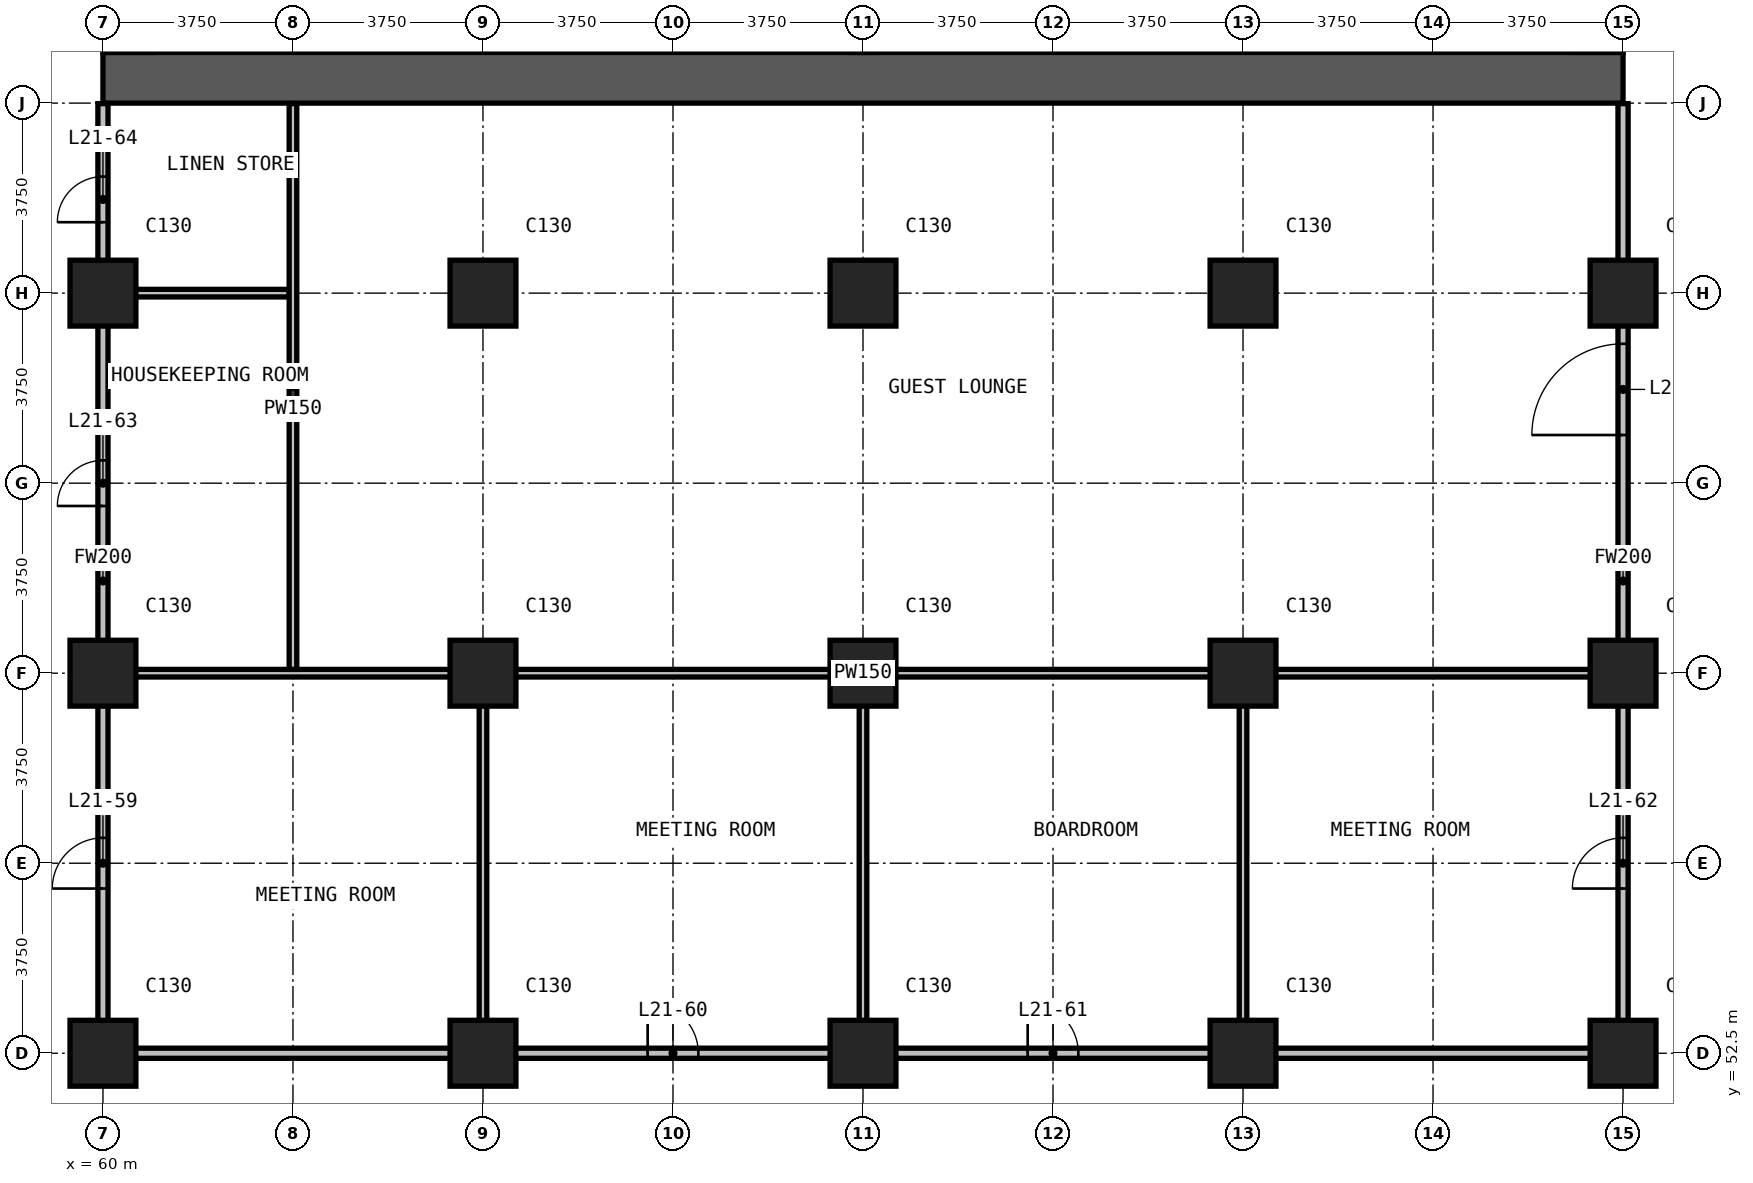
"""IFC4 building model, lengths in metres.
Left out: names, types, materials, properties, quantities, classifications, styles, units other than length and angle.
Written with IfcOpenShell. Run it as: python <this file> out.ifc"""

import sys

from ifc_helpers import new_model, si_unit, direction, frame, frame_2d, origin, origin_2d, place, context, subcontext, project, spatial, rectangle, extrude, element, fill, save


model = new_model("IFC4")
c1 = context("Model", 3, precision=1e-05, world=origin(), true_north=direction((0.0, 1.0)))
c2 = subcontext(c1, "Body", "Model", "MODEL_VIEW")
j1 = project(units=[si_unit("LENGTHUNIT", "METRE"), si_unit("PLANEANGLEUNIT", "RADIAN")], contexts=[c1])
p1 = place(None, origin())
s1 = spatial("IfcSite", under=j1, at=p1, CompositionType="ELEMENT")
p2 = place(p1, origin())
s2 = spatial("IfcBuilding", under=s1, at=p2, CompositionType="ELEMENT")
p3 = place(p2, frame((0.0, 0.0, 89.0)))
s3 = spatial("IfcBuildingStorey", under=s2, at=p3, CompositionType="ELEMENT", Elevation=89.0)
for number, where, z_axis, x_axis in (
    (1, (60.0, 52.5, 0.0), (0.0, 0.0, 1.0), (1.0, 0.0, 0.0)),
    (2, (60.0, 60.0, 0.0), (0.0, 0.0, 1.0), (1.0, 0.0, 0.0)),
    (3, (60.0, 67.5, 0.0), (0.0, 0.0, 1.0), (1.0, 0.0, 0.0)),
    (4, (67.5, 52.5, 0.0), (0.0, 0.0, 1.0), (1.0, 0.0, 0.0)),
    (5, (67.5, 60.0, 0.0), (0.0, 0.0, 1.0), (1.0, 0.0, 0.0)),
    (6, (67.5, 67.5, 0.0), (0.0, 0.0, 1.0), (1.0, 0.0, 0.0)),
    (7, (75.0, 52.5, 0.0), (0.0, 0.0, 1.0), (1.0, 0.0, 0.0)),
    (8, (75.0, 60.0, 0.0), (0.0, 0.0, 1.0), (1.0, 0.0, 0.0)),
    (9, (75.0, 67.5, 0.0), (0.0, 0.0, 1.0), (1.0, 0.0, 0.0)),
    (10, (82.5, 52.5, 0.0), (0.0, 0.0, 1.0), (1.0, 0.0, 0.0)),
    (11, (82.5, 60.0, 0.0), (0.0, 0.0, 1.0), (1.0, 0.0, 0.0)),
    (12, (82.5, 67.5, 0.0), (0.0, 0.0, 1.0), (1.0, 0.0, 0.0)),
    (13, (90.0, 52.5, 0.0), (0.0, 0.0, 1.0), (1.0, 0.0, 0.0)),
    (14, (90.0, 60.0, 0.0), (0.0, 0.0, 1.0), (1.0, 0.0, 0.0)),
    (15, (90.0, 67.5, 0.0), (0.0, 0.0, 1.0), (1.0, 0.0, 0.0)),
):
    element("IfcColumn", number, at=place(p3, frame(where, z_axis=z_axis, x_axis=x_axis)), inside=s3, PredefinedType="COLUMN", context=c2, shape_type="SweptSolid", body=[
        extrude(rectangle(XDim=1.3, YDim=1.3, at=origin_2d()), origin(), (0.0, 0.0, 1.0), 3.3),
    ])
p4 = place(p3, frame((60.0, 71.75, 0.0), z_axis=(0.0, 0.0, 1.0), x_axis=(1.0, 0.0, 0.0)))
e16 = element("IfcWall", 16, at=p4, inside=s3, PredefinedType="SHEAR", context=c2, shape_type="SweptSolid", body=[
    extrude(rectangle(XDim=30.0, YDim=1.0, at=frame_2d((15.0, 0.0))), origin(), (0.0, 0.0, 1.0), 3.3),
])
p5 = place(p3, frame((60.1, 52.5, 0.0), z_axis=(0.0, 0.0, 1.0), x_axis=(1.0, 0.0, 0.0)))
e17 = element("IfcWall", 17, at=p5, inside=s3, PredefinedType="PARTITIONING", context=c2, shape_type="SweptSolid", body=[
    extrude(rectangle(XDim=29.8, YDim=0.2, at=frame_2d((14.9, 0.0))), origin(), (0.0, 0.0, 1.0), 3.0),
])
p6 = place(p5, frame((10.65, 0.0, 0.0)))
e18 = element("IfcOpeningElement", 18, at=p6, cuts=e17, PredefinedType="OPENING", context=c2, shape_type="SweptSolid", body=[
    extrude(rectangle(XDim=1.0, YDim=2.2, at=frame_2d((0.5, 1.1))), frame((0.0, 0.11, 0.0), z_axis=(0.0, -1.0, 0.0), x_axis=(1.0, 0.0, 0.0)), (0.0, 0.0, 1.0), 0.22),
])
p7 = place(p5, frame((18.15, 0.0, 0.0)))
e19 = element("IfcOpeningElement", 19, at=p7, cuts=e17, PredefinedType="OPENING", context=c2, shape_type="SweptSolid", body=[
    extrude(rectangle(XDim=1.0, YDim=2.2, at=frame_2d((0.5, 1.1))), frame((0.0, 0.11, 0.0), z_axis=(0.0, -1.0, 0.0), x_axis=(1.0, 0.0, 0.0)), (0.0, 0.0, 1.0), 0.22),
])
p8 = place(p3, frame((60.0, 52.4, 0.0), z_axis=(0.0, 0.0, 1.0), x_axis=(0.0, 1.0, 0.0)))
e20 = element("IfcWall", 20, at=p8, inside=s3, PredefinedType="PARTITIONING", context=c2, shape_type="SweptSolid", body=[
    extrude(rectangle(XDim=18.84, YDim=0.2, at=frame_2d((9.42, 0.0))), origin(), (0.0, 0.0, 1.0), 3.0),
])
p9 = place(p8, frame((3.35, 0.0, 0.0)))
e21 = element("IfcOpeningElement", 21, at=p9, cuts=e20, PredefinedType="OPENING", context=c2, shape_type="SweptSolid", body=[
    extrude(rectangle(XDim=1.0, YDim=2.2, at=frame_2d((0.5, 1.1))), frame((0.0, 0.11, 0.0), z_axis=(0.0, -1.0, 0.0), x_axis=(1.0, 0.0, 0.0)), (0.0, 0.0, 1.0), 0.22),
])
p10 = place(p8, frame((10.9, 0.0, 0.0)))
e22 = element("IfcOpeningElement", 22, at=p10, cuts=e20, PredefinedType="OPENING", context=c2, shape_type="SweptSolid", body=[
    extrude(rectangle(XDim=0.9, YDim=2.2, at=frame_2d((0.45, 1.1))), frame((0.0, 0.11, 0.0), z_axis=(0.0, -1.0, 0.0), x_axis=(1.0, 0.0, 0.0)), (0.0, 0.0, 1.0), 0.22),
])
p11 = place(p8, frame((16.5, 0.0, 0.0)))
e23 = element("IfcOpeningElement", 23, at=p11, cuts=e20, PredefinedType="OPENING", context=c2, shape_type="SweptSolid", body=[
    extrude(rectangle(XDim=0.9, YDim=2.2, at=frame_2d((0.45, 1.1))), frame((0.0, 0.11, 0.0), z_axis=(0.0, -1.0, 0.0), x_axis=(1.0, 0.0, 0.0)), (0.0, 0.0, 1.0), 0.22),
])
p12 = place(p3, frame((90.0, 52.4, 0.0), z_axis=(0.0, 0.0, 1.0), x_axis=(0.0, 1.0, 0.0)))
e24 = element("IfcWall", 24, at=p12, inside=s3, PredefinedType="PARTITIONING", context=c2, shape_type="SweptSolid", body=[
    extrude(rectangle(XDim=18.84, YDim=0.2, at=frame_2d((9.42, 0.0))), origin(), (0.0, 0.0, 1.0), 3.0),
])
p13 = place(p12, frame((3.35, 0.0, 0.0)))
e25 = element("IfcOpeningElement", 25, at=p13, cuts=e24, PredefinedType="OPENING", context=c2, shape_type="SweptSolid", body=[
    extrude(rectangle(XDim=1.0, YDim=2.2, at=frame_2d((0.5, 1.1))), frame((0.0, 0.11, 0.0), z_axis=(0.0, -1.0, 0.0), x_axis=(1.0, 0.0, 0.0)), (0.0, 0.0, 1.0), 0.22),
])
p14 = place(p12, frame((12.3, 0.0, 0.0)))
e26 = element("IfcOpeningElement", 26, at=p14, cuts=e24, PredefinedType="OPENING", context=c2, shape_type="SweptSolid", body=[
    extrude(rectangle(XDim=1.8, YDim=2.2, at=frame_2d((0.9, 1.1))), frame((0.0, 0.11, 0.0), z_axis=(0.0, -1.0, 0.0), x_axis=(1.0, 0.0, 0.0)), (0.0, 0.0, 1.0), 0.22),
])
p15 = place(p3, frame((60.1, 60.0, 0.0), z_axis=(0.0, 0.0, 1.0), x_axis=(1.0, 0.0, 0.0)))
e27 = element("IfcWall", 27, at=p15, inside=s3, PredefinedType="PARTITIONING", context=c2, shape_type="SweptSolid", body=[
    extrude(rectangle(XDim=29.8, YDim=0.15, at=frame_2d((14.9, 0.0))), origin(), (0.0, 0.0, 1.0), 3.0),
])
p16 = place(p3, frame((60.1, 67.5, 0.0), z_axis=(0.0, 0.0, 1.0), x_axis=(1.0, 0.0, 0.0)))
e28 = element("IfcWall", 28, at=p16, inside=s3, PredefinedType="PARTITIONING", context=c2, shape_type="SweptSolid", body=[
    extrude(rectangle(XDim=3.575, YDim=0.15, at=frame_2d((1.788, 0.0))), origin(), (0.0, 0.0, 1.0), 3.0),
])
p17 = place(p3, frame((63.75, 60.075, 0.0), z_axis=(0.0, 0.0, 1.0), x_axis=(0.0, 1.0, 0.0)))
e29 = element("IfcWall", 29, at=p17, inside=s3, PredefinedType="PARTITIONING", context=c2, shape_type="SweptSolid", body=[
    extrude(rectangle(XDim=11.165, YDim=0.15, at=frame_2d((5.583, 0.0))), origin(), (0.0, 0.0, 1.0), 3.0),
])
for number, where, z_axis, x_axis in (
    (30, (67.5, 52.6, 0.0), (0.0, 0.0, 1.0), (0.0, 1.0, 0.0)),
    (31, (75.0, 52.6, 0.0), (0.0, 0.0, 1.0), (0.0, 1.0, 0.0)),
    (32, (82.5, 52.6, 0.0), (0.0, 0.0, 1.0), (0.0, 1.0, 0.0)),
):
    element("IfcWall", number, at=place(p3, frame(where, z_axis=z_axis, x_axis=x_axis)), inside=s3, PredefinedType="PARTITIONING", context=c2, shape_type="SweptSolid", body=[
        extrude(rectangle(XDim=7.325, YDim=0.15, at=frame_2d((3.663, 0.0))), origin(), (0.0, 0.0, 1.0), 3.0),
    ])
p18 = place(p9, origin())
e33 = element("IfcDoor", 33, at=p18, inside=s3, OperationType="SINGLE_SWING_RIGHT", PredefinedType="DOOR", context=c2, shape_type="SweptSolid", body=[
    extrude(rectangle(XDim=1.0, YDim=2.2, at=frame_2d((0.5, 1.1))), frame((0.0, 0.025, 0.0), z_axis=(0.0, -1.0, 0.0), x_axis=(1.0, 0.0, 0.0)), (0.0, 0.0, 1.0), 0.05),
])
fill(e21, e33)
p19 = place(p6, origin())
e34 = element("IfcDoor", 34, at=p19, inside=s3, OperationType="SINGLE_SWING_LEFT", PredefinedType="DOOR", context=c2, shape_type="SweptSolid", body=[
    extrude(rectangle(XDim=1.0, YDim=2.2, at=frame_2d((0.5, 1.1))), frame((0.0, 0.025, 0.0), z_axis=(0.0, -1.0, 0.0), x_axis=(1.0, 0.0, 0.0)), (0.0, 0.0, 1.0), 0.05),
])
fill(e18, e34)
p20 = place(p7, origin())
e35 = element("IfcDoor", 35, at=p20, inside=s3, OperationType="SINGLE_SWING_RIGHT", PredefinedType="DOOR", context=c2, shape_type="SweptSolid", body=[
    extrude(rectangle(XDim=1.0, YDim=2.2, at=frame_2d((0.5, 1.1))), frame((0.0, 0.025, 0.0), z_axis=(0.0, -1.0, 0.0), x_axis=(1.0, 0.0, 0.0)), (0.0, 0.0, 1.0), 0.05),
])
fill(e19, e35)
p21 = place(p13, origin())
e36 = element("IfcDoor", 36, at=p21, inside=s3, OperationType="SINGLE_SWING_RIGHT", PredefinedType="DOOR", context=c2, shape_type="SweptSolid", body=[
    extrude(rectangle(XDim=1.0, YDim=2.2, at=frame_2d((0.5, 1.1))), frame((0.0, 0.025, 0.0), z_axis=(0.0, -1.0, 0.0), x_axis=(1.0, 0.0, 0.0)), (0.0, 0.0, 1.0), 0.05),
])
fill(e25, e36)
p22 = place(p10, origin())
e37 = element("IfcDoor", 37, at=p22, inside=s3, OperationType="SINGLE_SWING_LEFT", PredefinedType="DOOR", context=c2, shape_type="SweptSolid", body=[
    extrude(rectangle(XDim=0.9, YDim=2.2, at=frame_2d((0.45, 1.1))), frame((0.0, 0.025, 0.0), z_axis=(0.0, -1.0, 0.0), x_axis=(1.0, 0.0, 0.0)), (0.0, 0.0, 1.0), 0.05),
])
fill(e22, e37)
p23 = place(p11, origin())
e38 = element("IfcDoor", 38, at=p23, inside=s3, OperationType="SINGLE_SWING_LEFT", PredefinedType="DOOR", context=c2, shape_type="SweptSolid", body=[
    extrude(rectangle(XDim=0.9, YDim=2.2, at=frame_2d((0.45, 1.1))), frame((0.0, 0.025, 0.0), z_axis=(0.0, -1.0, 0.0), x_axis=(1.0, 0.0, 0.0)), (0.0, 0.0, 1.0), 0.05),
])
fill(e23, e38)
p24 = place(p14, origin())
e39 = element("IfcDoor", 39, at=p24, inside=s3, OperationType="DOUBLE_DOOR_SINGLE_SWING", PredefinedType="DOOR", context=c2, shape_type="SweptSolid", body=[
    extrude(rectangle(XDim=1.8, YDim=2.2, at=frame_2d((0.9, 1.1))), frame((0.0, 0.025, 0.0), z_axis=(0.0, -1.0, 0.0), x_axis=(1.0, 0.0, 0.0)), (0.0, 0.0, 1.0), 0.05),
])
fill(e26, e39)
save(model, sys.argv[1])
